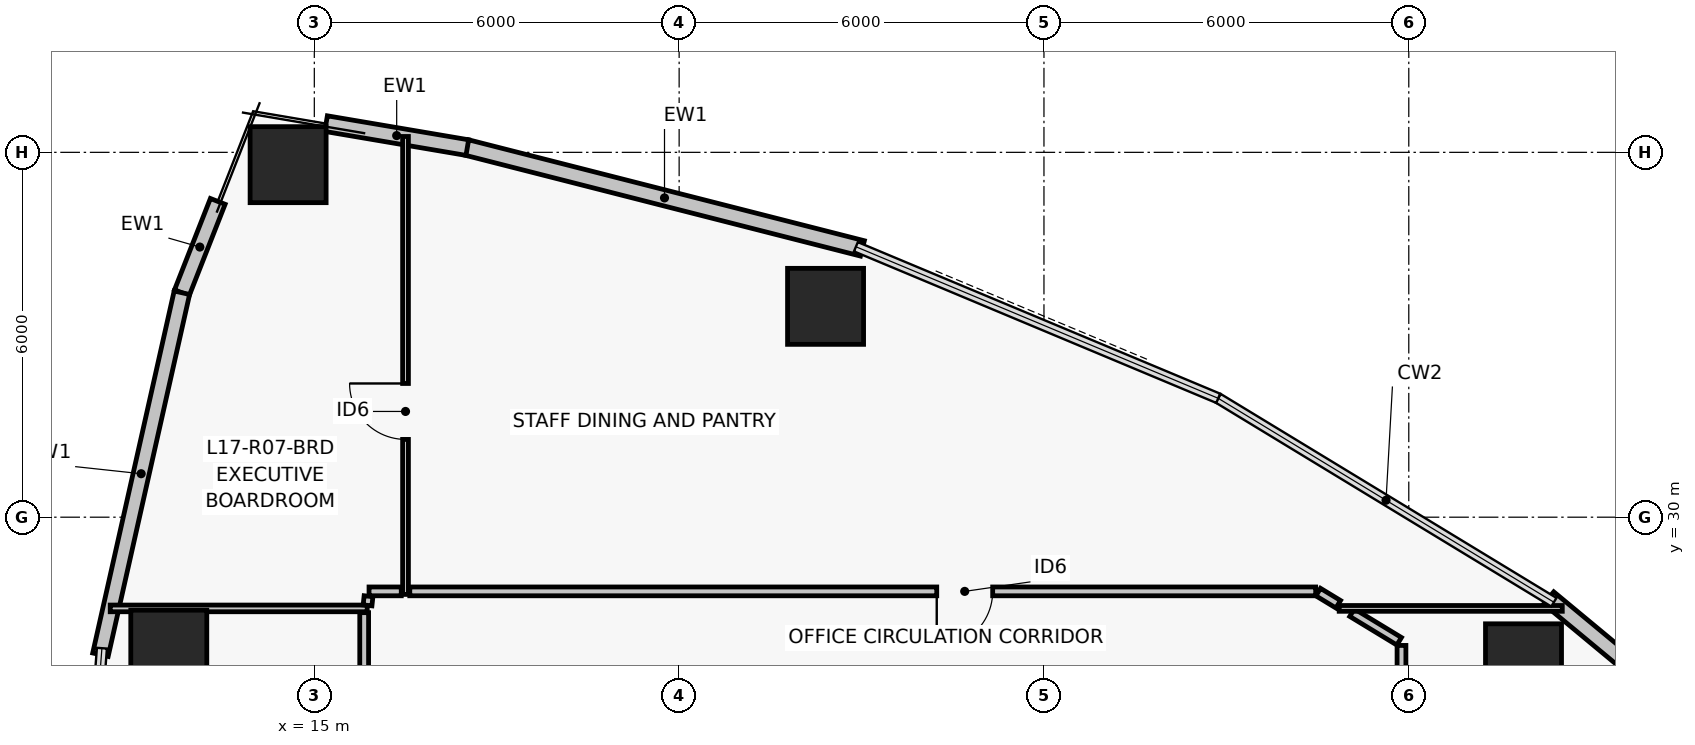
"""IFC4 building model, lengths in metres.
Left out: names, types, materials, properties, quantities, classifications, styles, units other than length and angle.
Written with IfcOpenShell. Run it as: python <this file> out.ifc"""

import sys

from ifc_helpers import new_model, si_unit, direction, frame, frame_2d, origin, origin_2d, place, context, subcontext, project, spatial, rectangle, hollow_rectangle, extrude, element, fill, save


model = new_model("IFC4")
c1 = context("Model", 3, precision=1e-05, world=origin(), true_north=direction((0.0, 1.0)))
c2 = subcontext(c1, "Body", "Model", "MODEL_VIEW")
j1 = project(units=[si_unit("LENGTHUNIT", "METRE"), si_unit("PLANEANGLEUNIT", "RADIAN")], contexts=[c1])
p1 = place(None, origin())
s1 = spatial("IfcSite", under=j1, at=p1, CompositionType="ELEMENT")
p2 = place(p1, origin())
s2 = spatial("IfcBuilding", under=s1, at=p2, CompositionType="ELEMENT")
p3 = place(p2, frame((0.0, 0.0, 72.24)))
s3 = spatial("IfcBuildingStorey", under=s2, at=p3, CompositionType="ELEMENT", Elevation=72.24)
for number, where, z_axis, x_axis in (
    (1, (34.887, 27.622, 0.0), (0.0, 0.0, 1.0), (1.0, 0.0, 0.0)),
    (2, (23.408, 33.467, 0.0), (0.0, 0.0, 1.0), (1.0, 0.0, 0.0)),
    (3, (14.569, 35.797, 0.0), (0.0, 0.0, 1.0), (1.0, 0.0, 0.0)),
    (4, (12.607, 27.846, 0.0), (0.0, 0.0, 1.0), (1.0, 0.0, 0.0)),
):
    element("IfcColumn", number, at=place(p3, frame(where, z_axis=z_axis, x_axis=x_axis)), inside=s3, PredefinedType="COLUMN", context=c2, shape_type="SweptSolid", body=[
        extrude(hollow_rectangle(XDim=1.25, YDim=1.25, WallThickness=0.05, at=origin_2d()), origin(), (0.0, 0.0, 1.0), 3.72),
    ])
p4 = place(p3, frame((35.301, 28.672, 0.0), z_axis=(0.0, 0.0, 1.0), x_axis=(0.76975316947, -0.638341646841, 0.0)))
e5 = element("IfcWall", 5, at=p4, inside=s3, PredefinedType="PARTITIONING", context=c2, shape_type="SweptSolid", body=[
    extrude(rectangle(XDim=6.718, YDim=0.26, at=frame_2d((3.359, 0.0))), origin(), (0.0, 0.0, 1.0), 3.47),
])
p5 = place(p3, frame((17.505, 36.081, 0.0), z_axis=(0.0, 0.0, 1.0), x_axis=(0.968981437296, -0.247133514876, 0.0)))
e6 = element("IfcWall", 6, at=p5, inside=s3, PredefinedType="PARTITIONING", context=c2, shape_type="SweptSolid", body=[
    extrude(rectangle(XDim=6.718, YDim=0.26, at=frame_2d((3.359, 0.0))), origin(), (0.0, 0.0, 1.0), 3.47),
])
p6 = place(p3, frame((15.193, 36.472, 0.0), z_axis=(0.0, 0.0, 1.0), x_axis=(0.985905269947, -0.167304508875, 0.0)))
e7 = element("IfcWall", 7, at=p6, inside=s3, PredefinedType="PARTITIONING", context=c2, shape_type="SweptSolid", body=[
    extrude(rectangle(XDim=2.357, YDim=0.26, at=frame_2d((1.178, 0.0))), origin(), (0.0, 0.0, 1.0), 3.47),
])
p7 = place(p3, frame((12.822, 33.691, 0.0), z_axis=(0.0, 0.0, 1.0), x_axis=(0.365488551504, 0.930815835018, 0.0)))
e8 = element("IfcWall", 8, at=p7, inside=s3, PredefinedType="PARTITIONING", context=c2, shape_type="SweptSolid", body=[
    extrude(rectangle(XDim=1.614, YDim=0.26, at=frame_2d((0.807, 0.0))), origin(), (0.0, 0.0, 1.0), 3.47),
])
p8 = place(p3, frame((11.482, 27.738, 0.0), z_axis=(0.0, 0.0, 1.0), x_axis=(0.219535044336, 0.975604614743, 0.0)))
e9 = element("IfcWall", 9, at=p8, inside=s3, PredefinedType="PARTITIONING", context=c2, shape_type="SweptSolid", body=[
    extrude(rectangle(XDim=6.102, YDim=0.26, at=frame_2d((3.051, 0.0))), origin(), (0.0, 0.0, 1.0), 3.47),
])
p9 = place(p3, frame((32.88, 27.22, 0.0), z_axis=(0.0, 0.0, 1.0), x_axis=(0.0, 1.0, 0.0)))
e10 = element("IfcWall", 10, at=p9, inside=s3, PredefinedType="PARTITIONING", context=c2, shape_type="SweptSolid", body=[
    extrude(rectangle(XDim=0.671, YDim=0.145, at=frame_2d((0.335, 0.0))), origin(), (0.0, 0.0, 1.0), 2.6),
])
p10 = place(p3, frame((32.842, 27.96, 0.0), z_axis=(0.0, 0.0, 1.0), x_axis=(-0.854770437211, 0.519006261686, 0.0)))
e11 = element("IfcWall", 11, at=p10, inside=s3, PredefinedType="PARTITIONING", context=c2, shape_type="SweptSolid", body=[
    extrude(rectangle(XDim=0.906, YDim=0.145, at=frame_2d((0.453, 0.0))), origin(), (0.0, 0.0, 1.0), 3.0),
])
p11 = place(p3, frame((31.84, 28.568, 0.0), z_axis=(0.0, 0.0, 1.0), x_axis=(-0.854857682939, 0.518862546269, 0.0)))
e12 = element("IfcWall", 12, at=p11, inside=s3, PredefinedType="PARTITIONING", context=c2, shape_type="SweptSolid", body=[
    extrude(rectangle(XDim=0.386, YDim=0.145, at=frame_2d((0.193, 0.0))), origin(), (0.0, 0.0, 1.0), 3.0),
])
p12 = place(p3, frame((31.469, 28.78, 0.0), z_axis=(0.0, 0.0, 1.0), x_axis=(-1.0, 0.0, 0.0)))
e13 = element("IfcWall", 13, at=p12, inside=s3, PredefinedType="PARTITIONING", context=c2, shape_type="SweptSolid", body=[
    extrude(rectangle(XDim=14.898, YDim=0.145, at=frame_2d((7.449, 0.0))), origin(), (0.0, 0.0, 1.0), 2.6),
])
p13 = place(p12, frame((5.312, 0.0, 0.0)))
e14 = element("IfcOpeningElement", 14, at=p13, cuts=e13, PredefinedType="OPENING", context=c2, shape_type="SweptSolid", body=[
    extrude(rectangle(XDim=0.92, YDim=2.05, at=frame_2d((0.46, 1.025))), frame((0.0, 0.083, 0.0), z_axis=(0.0, -1.0, 0.0), x_axis=(1.0, 0.0, 0.0)), (0.0, 0.0, 1.0), 0.165),
])
p14 = place(p3, frame((16.43, 28.78, 0.0), z_axis=(0.0, 0.0, 1.0), x_axis=(-1.0, 0.0, 0.0)))
e15 = element("IfcWall", 15, at=p14, inside=s3, PredefinedType="PARTITIONING", context=c2, shape_type="SweptSolid", body=[
    extrude(rectangle(XDim=0.53, YDim=0.145, at=frame_2d((0.265, 0.0))), origin(), (0.0, 0.0, 1.0), 3.0),
])
p15 = place(p3, frame((15.82, 28.43, 0.0), z_axis=(0.0, 0.0, 1.0), x_axis=(0.0, -1.0, 0.0)))
e16 = element("IfcWall", 16, at=p15, inside=s3, PredefinedType="PARTITIONING", context=c2, shape_type="SweptSolid", body=[
    extrude(rectangle(XDim=6.36, YDim=0.145, at=frame_2d((3.18, 0.0))), origin(), (0.0, 0.0, 1.0), 2.6),
])
p16 = place(p15, frame((5.16, 0.0, 0.0)))
e17 = element("IfcOpeningElement", 17, at=p16, cuts=e16, PredefinedType="OPENING", context=c2, shape_type="SweptSolid", body=[
    extrude(rectangle(XDim=0.92, YDim=2.05, at=frame_2d((0.46, 1.025))), frame((0.0, 0.083, 0.0), z_axis=(0.0, -1.0, 0.0), x_axis=(1.0, 0.0, 0.0)), (0.0, 0.0, 1.0), 0.165),
])
p17 = place(p3, frame((16.5, 28.73, 0.0), z_axis=(0.0, 0.0, 1.0), x_axis=(0.0, 1.0, 0.0)))
e18 = element("IfcWall", 18, at=p17, inside=s3, PredefinedType="PARTITIONING", context=c2, shape_type="SweptSolid", body=[
    extrude(rectangle(XDim=7.531, YDim=0.095, at=frame_2d((3.765, 0.0))), origin(), (0.0, 0.0, 1.0), 2.6),
])
p18 = place(p17, frame((2.549, 0.0, 0.0)))
e19 = element("IfcOpeningElement", 19, at=p18, cuts=e18, PredefinedType="OPENING", context=c2, shape_type="SweptSolid", body=[
    extrude(rectangle(XDim=0.92, YDim=2.05, at=frame_2d((0.46, 1.025))), frame((0.0, 0.057, 0.0), z_axis=(0.0, -1.0, 0.0), x_axis=(1.0, 0.0, 0.0)), (0.0, 0.0, 1.0), 0.115),
])
p19 = place(p3, frame((11.644, 28.5, 0.0), z_axis=(0.0, 0.0, 1.0), x_axis=(1.0, 0.0, 0.0)))
e20 = element("IfcWall", 20, at=p19, inside=s3, PredefinedType="PARTITIONING", context=c2, shape_type="SweptSolid", body=[
    extrude(rectangle(XDim=4.227, YDim=0.11, at=frame_2d((2.113, 0.0))), origin(), (0.0, 0.0, 1.0), 2.85),
])
p20 = place(p3, frame((31.856, 28.5, 0.0), z_axis=(0.0, 0.0, 1.0), x_axis=(1.0, 0.0, 0.0)))
e21 = element("IfcWall", 21, at=p20, inside=s3, PredefinedType="PARTITIONING", context=c2, shape_type="SweptSolid", body=[
    extrude(rectangle(XDim=3.669, YDim=0.095, at=frame_2d((1.834, 0.0))), origin(), (0.0, 0.0, 1.0), 2.85),
])
p21 = place(p3, frame((15.892, 28.7, 0.0), z_axis=(0.0, 0.0, 1.0), x_axis=(-0.107955324157, -0.994155746343, 0.0)))
e22 = element("IfcWall", 22, at=p21, inside=s3, PredefinedType="PARTITIONING", context=c2, shape_type="SweptSolid", body=[
    extrude(rectangle(XDim=0.152, YDim=0.145, at=frame_2d((0.076, 0.0))), origin(), (0.0, 0.0, 1.0), 3.47),
])
p22 = place(p13, origin())
e23 = element("IfcDoor", 23, at=p22, inside=s3, OperationType="SINGLE_SWING_RIGHT", PredefinedType="DOOR", context=c2, shape_type="SweptSolid", body=[
    extrude(rectangle(XDim=0.92, YDim=2.05, at=frame_2d((0.46, 1.025))), frame((0.0, 0.025, 0.0), z_axis=(0.0, -1.0, 0.0), x_axis=(1.0, 0.0, 0.0)), (0.0, 0.0, 1.0), 0.05),
])
fill(e14, e23)
p23 = place(p18, origin())
e24 = element("IfcDoor", 24, at=p23, inside=s3, OperationType="SINGLE_SWING_RIGHT", PredefinedType="DOOR", context=c2, shape_type="SweptSolid", body=[
    extrude(rectangle(XDim=0.92, YDim=2.05, at=frame_2d((0.46, 1.025))), frame((0.0, 0.025, 0.0), z_axis=(0.0, -1.0, 0.0), x_axis=(1.0, 0.0, 0.0)), (0.0, 0.0, 1.0), 0.05),
])
fill(e19, e24)
save(model, sys.argv[1])
